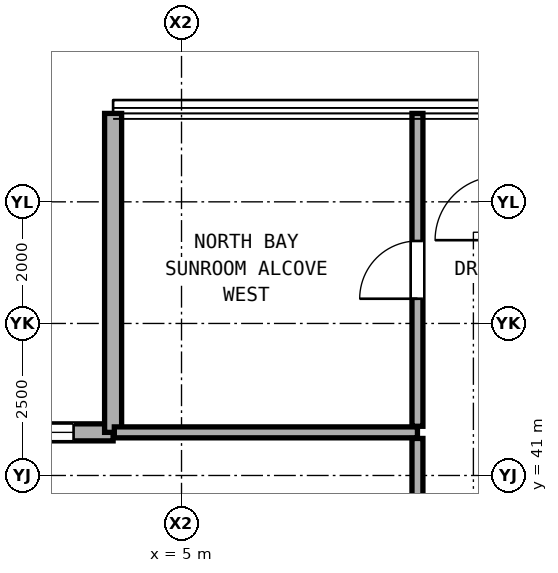
"""IFC4 building model, lengths in metres.
Left out: names, types, materials, properties, quantities, classifications, styles, units other than length and angle.
Written with IfcOpenShell. Run it as: python <this file> out.ifc"""

import sys

from ifc_helpers import new_model, si_unit, direction, frame, frame_2d, origin, place, context, subcontext, project, spatial, rectangle, extrude, element, fill, save


model = new_model("IFC4")
c1 = context("Model", 3, precision=1e-05, world=origin(), true_north=direction((0.0, 1.0)))
c2 = subcontext(c1, "Body", "Model", "MODEL_VIEW")
j1 = project(units=[si_unit("LENGTHUNIT", "METRE"), si_unit("PLANEANGLEUNIT", "RADIAN")], contexts=[c1])
p1 = place(None, origin())
s1 = spatial("IfcSite", under=j1, at=p1, CompositionType="ELEMENT")
p2 = place(p1, origin())
s2 = spatial("IfcBuilding", under=s1, at=p2, CompositionType="ELEMENT")
p3 = place(p2, frame((0.0, 0.0, 180.4)))
s3 = spatial("IfcBuildingStorey", under=s2, at=p3, CompositionType="ELEMENT", Elevation=180.4)
p4 = place(p3, frame((3.875, 41.709, 0.0), z_axis=(0.0, 0.0, 1.0), x_axis=(-1.0, 0.0, 0.0)))
e1 = element("IfcWall", 1, at=p4, inside=s3, PredefinedType="SOLIDWALL", context=c2, shape_type="SweptSolid", body=[
    extrude(rectangle(XDim=5.245, YDim=0.28, at=frame_2d((2.623, 0.0))), origin(), (0.0, 0.0, 1.0), 3.03),
])
p5 = place(p4, frame((0.65, 0.0, 0.85)))
e2 = element("IfcOpeningElement", 2, at=p5, cuts=e1, PredefinedType="OPENING", context=c2, shape_type="SweptSolid", body=[
    extrude(rectangle(XDim=1.1, YDim=2.0, at=frame_2d((0.55, 1.0))), frame((0.0, 0.15, 0.0), z_axis=(0.0, -1.0, 0.0), x_axis=(1.0, 0.0, 0.0)), (0.0, 0.0, 1.0), 0.3),
])
p6 = place(p3, frame((3.875, 46.954, 0.0), z_axis=(0.0, 0.0, 1.0), x_axis=(0.0, -1.0, 0.0)))
e3 = element("IfcWall", 3, at=p6, inside=s3, PredefinedType="SOLIDWALL", context=c2, shape_type="SweptSolid", body=[
    extrude(rectangle(XDim=5.245, YDim=0.28, at=frame_2d((2.623, 0.0))), origin(), (0.0, 0.0, 1.0), 3.03),
])
p7 = place(p3, frame((3.895, 41.709, 0.0), z_axis=(0.0, 0.0, 1.0), x_axis=(1.0, 0.0, 0.0)))
e4 = element("IfcWall", 4, at=p7, inside=s3, PredefinedType="PARTITIONING", context=c2, shape_type="SweptSolid", body=[
    extrude(rectangle(XDim=4.985, YDim=0.18, at=frame_2d((2.492, 0.0))), origin(), (0.0, 0.0, 1.0), 3.05),
])
p8 = place(p3, frame((8.88, 32.923, 0.0), z_axis=(0.0, 0.0, 1.0), x_axis=(0.0, 1.0, 0.0)))
e5 = element("IfcWall", 5, at=p8, inside=s3, PredefinedType="PARTITIONING", context=c2, shape_type="SweptSolid", body=[
    extrude(rectangle(XDim=8.686, YDim=0.18, at=frame_2d((4.343, 0.0))), origin(), (0.0, 0.0, 1.0), 2.442),
])
p9 = place(p8, frame((3.818, 0.0, 0.0)))
e6 = element("IfcOpeningElement", 6, at=p9, cuts=e5, PredefinedType="OPENING", context=c2, shape_type="SweptSolid", body=[
    extrude(rectangle(XDim=1.05, YDim=2.2, at=frame_2d((0.525, 1.1))), frame((0.0, 0.1, 0.0), z_axis=(0.0, -1.0, 0.0), x_axis=(1.0, 0.0, 0.0)), (0.0, 0.0, 1.0), 0.2),
])
p10 = place(p3, frame((8.88, 41.809, 0.0), z_axis=(0.0, 0.0, 1.0), x_axis=(0.0, 1.0, 0.0)))
e7 = element("IfcWall", 7, at=p10, inside=s3, PredefinedType="PARTITIONING", context=c2, shape_type="SweptSolid", body=[
    extrude(rectangle(XDim=5.145, YDim=0.18, at=frame_2d((2.573, 0.0))), origin(), (0.0, 0.0, 1.0), 3.05),
])
p11 = place(p10, frame((2.097, 0.0, 0.0)))
e8 = element("IfcOpeningElement", 8, at=p11, cuts=e7, PredefinedType="OPENING", context=c2, shape_type="SweptSolid", body=[
    extrude(rectangle(XDim=0.95, YDim=2.15, at=frame_2d((0.475, 1.075))), frame((0.0, 0.1, 0.0), z_axis=(0.0, -1.0, 0.0), x_axis=(1.0, 0.0, 0.0)), (0.0, 0.0, 1.0), 0.2),
])
p12 = place(p5, origin())
e9 = element("IfcWindow", 9, at=p12, inside=s3, PartitioningType="SINGLE_PANEL", PredefinedType="WINDOW", context=c2, shape_type="SweptSolid", body=[
    extrude(rectangle(XDim=1.1, YDim=2.0, at=frame_2d((0.55, 1.0))), frame((0.0, 0.03, 0.0), z_axis=(0.0, -1.0, 0.0), x_axis=(1.0, 0.0, 0.0)), (0.0, 0.0, 1.0), 0.06),
])
fill(e2, e9)
p13 = place(p11, origin())
e10 = element("IfcDoor", 10, at=p13, inside=s3, OperationType="SINGLE_SWING_LEFT", PredefinedType="DOOR", context=c2, shape_type="SweptSolid", body=[
    extrude(rectangle(XDim=0.95, YDim=2.15, at=frame_2d((0.475, 1.075))), frame((0.0, 0.025, 0.0), z_axis=(0.0, -1.0, 0.0), x_axis=(1.0, 0.0, 0.0)), (0.0, 0.0, 1.0), 0.05),
])
fill(e8, e10)
save(model, sys.argv[1])
